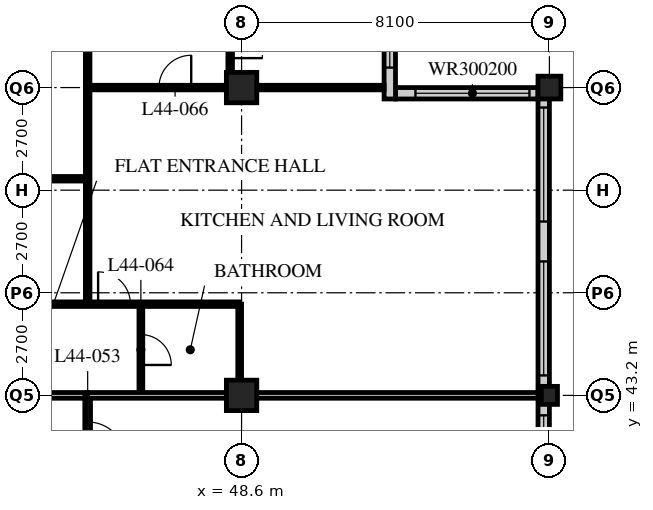
"""IFC4 building model, lengths in metres.
Left out: names, types, materials, properties, quantities, classifications, styles, units other than length and angle.
Written with IfcOpenShell. Run it as: python <this file> out.ifc"""

import sys

from ifc_helpers import new_model, si_unit, direction, frame, frame_2d, origin, origin_2d, place, context, subcontext, project, spatial, rectangle, hollow_rectangle, i_section, extrude, element, fill, save


model = new_model("IFC4")
c1 = context("Model", 3, precision=1e-05, world=origin(), true_north=direction((0.0, 1.0)))
c2 = subcontext(c1, "Body", "Model", "MODEL_VIEW")
j1 = project(units=[si_unit("LENGTHUNIT", "METRE"), si_unit("PLANEANGLEUNIT", "RADIAN")], contexts=[c1])
p1 = place(None, origin())
s1 = spatial("IfcSite", under=j1, at=p1, CompositionType="ELEMENT")
p2 = place(p1, origin())
s2 = spatial("IfcBuilding", under=s1, at=p2, CompositionType="ELEMENT")
p3 = place(p2, frame((0.0, 0.0, 174.0)))
s3 = spatial("IfcBuildingStorey", under=s2, at=p3, CompositionType="ELEMENT", Elevation=174.0)
for number, where, z_axis, x_axis in (
    (1, (48.6, 43.2, 0.0), (0.0, 0.0, 1.0), (1.0, 0.0, 0.0)),
    (2, (48.6, 51.3, 0.0), (0.0, 0.0, 1.0), (1.0, 0.0, 0.0)),
):
    element("IfcColumn", number, at=place(p3, frame(where, z_axis=z_axis, x_axis=x_axis)), inside=s3, PredefinedType="COLUMN", context=c2, shape_type="SweptSolid", body=[
        extrude(hollow_rectangle(XDim=0.8, YDim=0.8, WallThickness=0.08, at=origin_2d()), origin(), (0.0, 0.0, 1.0), 3.6),
    ])
p4 = place(p3, frame((56.7, 43.2, 0.0), z_axis=(0.0, 0.0, 1.0), x_axis=(1.0, 0.0, 0.0)))
e3 = element("IfcColumn", 3, at=p4, inside=s3, PredefinedType="COLUMN", context=c2, shape_type="SweptSolid", body=[
    extrude(i_section(OverallWidth=0.424, OverallDepth=0.475, WebThickness=0.048, FlangeThickness=0.077, FilletRadius=0.015, at=origin_2d()), origin(), (0.0, 0.0, 1.0), 3.6),
])
p5 = place(p3, frame((56.7, 51.3, 0.0), z_axis=(0.0, 0.0, 1.0), x_axis=(1.0, 0.0, 0.0)))
e4 = element("IfcColumn", 4, at=p5, inside=s3, PredefinedType="COLUMN", context=c2, shape_type="SweptSolid", body=[
    extrude(hollow_rectangle(XDim=0.6, YDim=0.6, WallThickness=0.05, at=origin_2d()), origin(), (0.0, 0.0, 1.0), 3.6),
])
p6 = place(p3, frame((56.55, 19.2, 0.0), z_axis=(0.0, 0.0, 1.0), x_axis=(0.0, 1.0, 0.0)))
e5 = element("IfcWall", 5, at=p6, inside=s3, PredefinedType="SOLIDWALL", context=c2, shape_type="SweptSolid", body=[
    extrude(rectangle(XDim=32.1, YDim=0.3, at=frame_2d((16.05, 0.0))), origin(), (0.0, 0.0, 1.0), 3.39),
])
p7 = place(p6, frame((0.225, 0.0, 0.6)))
e6 = element("IfcOpeningElement", 6, at=p7, cuts=e5, PredefinedType="OPENING", context=c2, shape_type="SweptSolid", body=[
    extrude(rectangle(XDim=3.0, YDim=2.4, at=frame_2d((1.5, 1.2))), frame((0.0, 0.16, 0.0), z_axis=(0.0, -1.0, 0.0), x_axis=(1.0, 0.0, 0.0)), (0.0, 0.0, 1.0), 0.32),
])
p8 = place(p6, frame((4.275, 0.0, 0.6)))
e7 = element("IfcOpeningElement", 7, at=p8, cuts=e5, PredefinedType="OPENING", context=c2, shape_type="SweptSolid", body=[
    extrude(rectangle(XDim=3.0, YDim=2.4, at=frame_2d((1.5, 1.2))), frame((0.0, 0.16, 0.0), z_axis=(0.0, -1.0, 0.0), x_axis=(1.0, 0.0, 0.0)), (0.0, 0.0, 1.0), 0.32),
])
p9 = place(p6, frame((8.325, 0.0, 0.6)))
e8 = element("IfcOpeningElement", 8, at=p9, cuts=e5, PredefinedType="OPENING", context=c2, shape_type="SweptSolid", body=[
    extrude(rectangle(XDim=3.0, YDim=2.4, at=frame_2d((1.5, 1.2))), frame((0.0, 0.16, 0.0), z_axis=(0.0, -1.0, 0.0), x_axis=(1.0, 0.0, 0.0)), (0.0, 0.0, 1.0), 0.32),
])
p10 = place(p6, frame((12.375, 0.0, 0.6)))
e9 = element("IfcOpeningElement", 9, at=p10, cuts=e5, PredefinedType="OPENING", context=c2, shape_type="SweptSolid", body=[
    extrude(rectangle(XDim=3.0, YDim=2.4, at=frame_2d((1.5, 1.2))), frame((0.0, 0.16, 0.0), z_axis=(0.0, -1.0, 0.0), x_axis=(1.0, 0.0, 0.0)), (0.0, 0.0, 1.0), 0.32),
])
p11 = place(p6, frame((16.425, 0.0, 0.6)))
e10 = element("IfcOpeningElement", 10, at=p11, cuts=e5, PredefinedType="OPENING", context=c2, shape_type="SweptSolid", body=[
    extrude(rectangle(XDim=3.0, YDim=2.4, at=frame_2d((1.5, 1.2))), frame((0.0, 0.16, 0.0), z_axis=(0.0, -1.0, 0.0), x_axis=(1.0, 0.0, 0.0)), (0.0, 0.0, 1.0), 0.32),
])
p12 = place(p6, frame((20.475, 0.0, 0.6)))
e11 = element("IfcOpeningElement", 11, at=p12, cuts=e5, PredefinedType="OPENING", context=c2, shape_type="SweptSolid", body=[
    extrude(rectangle(XDim=3.0, YDim=2.4, at=frame_2d((1.5, 1.2))), frame((0.0, 0.16, 0.0), z_axis=(0.0, -1.0, 0.0), x_axis=(1.0, 0.0, 0.0)), (0.0, 0.0, 1.0), 0.32),
])
p13 = place(p6, frame((24.525, 0.0, 0.6)))
e12 = element("IfcOpeningElement", 12, at=p13, cuts=e5, PredefinedType="OPENING", context=c2, shape_type="SweptSolid", body=[
    extrude(rectangle(XDim=3.0, YDim=2.4, at=frame_2d((1.5, 1.2))), frame((0.0, 0.16, 0.0), z_axis=(0.0, -1.0, 0.0), x_axis=(1.0, 0.0, 0.0)), (0.0, 0.0, 1.0), 0.32),
])
p14 = place(p6, frame((28.575, 0.0, 0.6)))
e13 = element("IfcOpeningElement", 13, at=p14, cuts=e5, PredefinedType="OPENING", context=c2, shape_type="SweptSolid", body=[
    extrude(rectangle(XDim=3.0, YDim=2.4, at=frame_2d((1.5, 1.2))), frame((0.0, 0.16, 0.0), z_axis=(0.0, -1.0, 0.0), x_axis=(1.0, 0.0, 0.0)), (0.0, 0.0, 1.0), 0.32),
])
p15 = place(p3, frame((56.4, 51.15, 0.0), z_axis=(0.0, 0.0, 1.0), x_axis=(-1.0, 0.0, 0.0)))
e14 = element("IfcWall", 14, at=p15, inside=s3, PredefinedType="SOLIDWALL", context=c2, shape_type="SweptSolid", body=[
    extrude(rectangle(XDim=3.75, YDim=0.3, at=frame_2d((1.875, 0.0))), origin(), (0.0, 0.0, 1.0), 3.39),
])
p16 = place(p15, frame((0.225, 0.0, 0.6)))
e15 = element("IfcOpeningElement", 15, at=p16, cuts=e14, PredefinedType="OPENING", context=c2, shape_type="SweptSolid", body=[
    extrude(rectangle(XDim=3.0, YDim=2.0, at=frame_2d((1.5, 1.0))), frame((0.0, 0.16, 0.0), z_axis=(0.0, -1.0, 0.0), x_axis=(1.0, 0.0, 0.0)), (0.0, 0.0, 1.0), 0.32),
])
p17 = place(p3, frame((52.5, 51.0, 0.0), z_axis=(0.0, 0.0, 1.0), x_axis=(0.0, 1.0, 0.0)))
e16 = element("IfcWall", 16, at=p17, inside=s3, PredefinedType="SOLIDWALL", context=c2, shape_type="SweptSolid", body=[
    extrude(rectangle(XDim=4.35, YDim=0.3, at=frame_2d((2.175, 0.0))), origin(), (0.0, 0.0, 1.0), 3.39),
])
p18 = place(p17, frame((0.825, 0.0, 0.6)))
e17 = element("IfcOpeningElement", 17, at=p18, cuts=e16, PredefinedType="OPENING", context=c2, shape_type="SweptSolid", body=[
    extrude(rectangle(XDim=3.0, YDim=2.0, at=frame_2d((1.5, 1.0))), frame((0.0, 0.16, 0.0), z_axis=(0.0, -1.0, 0.0), x_axis=(1.0, 0.0, 0.0)), (0.0, 0.0, 1.0), 0.32),
])
p19 = place(p3, frame((12.15, 43.2, 0.0), z_axis=(0.0, 0.0, 1.0), x_axis=(1.0, 0.0, 0.0)))
e18 = element("IfcWall", 18, at=p19, inside=s3, PredefinedType="PARTITIONING", context=c2, shape_type="SweptSolid", body=[
    extrude(rectangle(XDim=32.4, YDim=0.15, at=frame_2d((16.2, 0.0))), origin(), (0.0, 0.0, 1.0), 2.778),
])
p20 = place(p19, frame((4.95, 0.0, 0.0)))
e19 = element("IfcOpeningElement", 19, at=p20, cuts=e18, PredefinedType="OPENING", context=c2, shape_type="SweptSolid", body=[
    extrude(rectangle(XDim=1.0, YDim=2.1, at=frame_2d((0.5, 1.05))), frame((0.0, 0.085, 0.0), z_axis=(0.0, -1.0, 0.0), x_axis=(1.0, 0.0, 0.0)), (0.0, 0.0, 1.0), 0.17),
])
p21 = place(p19, frame((13.05, 0.0, 0.0)))
e20 = element("IfcOpeningElement", 20, at=p21, cuts=e18, PredefinedType="OPENING", context=c2, shape_type="SweptSolid", body=[
    extrude(rectangle(XDim=1.0, YDim=2.1, at=frame_2d((0.5, 1.05))), frame((0.0, 0.085, 0.0), z_axis=(0.0, -1.0, 0.0), x_axis=(1.0, 0.0, 0.0)), (0.0, 0.0, 1.0), 0.17),
])
p22 = place(p19, frame((21.15, 0.0, 0.0)))
e21 = element("IfcOpeningElement", 21, at=p22, cuts=e18, PredefinedType="OPENING", context=c2, shape_type="SweptSolid", body=[
    extrude(rectangle(XDim=1.0, YDim=2.1, at=frame_2d((0.5, 1.05))), frame((0.0, 0.085, 0.0), z_axis=(0.0, -1.0, 0.0), x_axis=(1.0, 0.0, 0.0)), (0.0, 0.0, 1.0), 0.17),
])
p23 = place(p19, frame((29.875, 0.0, 0.0)))
e22 = element("IfcOpeningElement", 22, at=p23, cuts=e18, PredefinedType="OPENING", context=c2, shape_type="SweptSolid", body=[
    extrude(rectangle(XDim=1.0, YDim=2.1, at=frame_2d((0.5, 1.05))), frame((0.0, 0.085, 0.0), z_axis=(0.0, -1.0, 0.0), x_axis=(1.0, 0.0, 0.0)), (0.0, 0.0, 1.0), 0.17),
])
p24 = place(p19, frame((1.525, 0.0, 0.0)))
e23 = element("IfcOpeningElement", 23, at=p24, cuts=e18, PredefinedType="OPENING", context=c2, shape_type="SweptSolid", body=[
    extrude(rectangle(XDim=1.0, YDim=2.1, at=frame_2d((0.5, 1.05))), frame((0.0, 0.085, 0.0), z_axis=(0.0, -1.0, 0.0), x_axis=(1.0, 0.0, 0.0)), (0.0, 0.0, 1.0), 0.17),
])
p25 = place(p3, frame((44.55, 18.9, 0.0), z_axis=(0.0, 0.0, 1.0), x_axis=(0.0, 1.0, 0.0)))
e24 = element("IfcWall", 24, at=p25, inside=s3, PredefinedType="PARTITIONING", context=c2, shape_type="SweptSolid", body=[
    extrude(rectangle(XDim=24.3, YDim=0.15, at=frame_2d((12.15, 0.0))), origin(), (0.0, 0.0, 1.0), 3.39),
])
p26 = place(p25, frame((2.35, 0.0, 0.0)))
e25 = element("IfcOpeningElement", 25, at=p26, cuts=e24, PredefinedType="OPENING", context=c2, shape_type="SweptSolid", body=[
    extrude(rectangle(XDim=1.0, YDim=2.1, at=frame_2d((0.5, 1.05))), frame((0.0, 0.085, 0.0), z_axis=(0.0, -1.0, 0.0), x_axis=(1.0, 0.0, 0.0)), (0.0, 0.0, 1.0), 0.17),
])
p27 = place(p25, frame((4.45, 0.0, 0.0)))
e26 = element("IfcOpeningElement", 26, at=p27, cuts=e24, PredefinedType="OPENING", context=c2, shape_type="SweptSolid", body=[
    extrude(rectangle(XDim=1.0, YDim=2.1, at=frame_2d((0.5, 1.05))), frame((0.0, 0.085, 0.0), z_axis=(0.0, -1.0, 0.0), x_axis=(1.0, 0.0, 0.0)), (0.0, 0.0, 1.0), 0.17),
])
p28 = place(p25, frame((18.55, 0.0, 0.0)))
e27 = element("IfcOpeningElement", 27, at=p28, cuts=e24, PredefinedType="OPENING", context=c2, shape_type="SweptSolid", body=[
    extrude(rectangle(XDim=1.0, YDim=2.1, at=frame_2d((0.5, 1.05))), frame((0.0, 0.085, 0.0), z_axis=(0.0, -1.0, 0.0), x_axis=(1.0, 0.0, 0.0)), (0.0, 0.0, 1.0), 0.17),
])
p29 = place(p25, frame((22.6, 0.0, 0.0)))
e28 = element("IfcOpeningElement", 28, at=p29, cuts=e24, PredefinedType="OPENING", context=c2, shape_type="SweptSolid", body=[
    extrude(rectangle(XDim=1.0, YDim=2.1, at=frame_2d((0.5, 1.05))), frame((0.0, 0.085, 0.0), z_axis=(0.0, -1.0, 0.0), x_axis=(1.0, 0.0, 0.0)), (0.0, 0.0, 1.0), 0.17),
])
p30 = place(p3, frame((45.95, 43.2, 0.0), z_axis=(0.0, 0.0, 1.0), x_axis=(0.0, 1.0, 0.0)))
e29 = element("IfcWall", 29, at=p30, inside=s3, PredefinedType="PARTITIONING", context=c2, shape_type="SweptSolid", body=[
    extrude(rectangle(XDim=2.4, YDim=0.1, at=frame_2d((1.2, 0.0))), origin(), (0.0, 0.0, 1.0), 3.39),
])
p31 = place(p30, frame((0.8, 0.0, 0.0)))
e30 = element("IfcOpeningElement", 30, at=p31, cuts=e29, PredefinedType="OPENING", context=c2, shape_type="SweptSolid", body=[
    extrude(rectangle(XDim=0.8, YDim=2.1, at=frame_2d((0.4, 1.05))), frame((0.0, 0.06, 0.0), z_axis=(0.0, -1.0, 0.0), x_axis=(1.0, 0.0, 0.0)), (0.0, 0.0, 1.0), 0.12),
])
p32 = place(p3, frame((48.55, 43.2, 0.0), z_axis=(0.0, 0.0, 1.0), x_axis=(0.0, 1.0, 0.0)))
e31 = element("IfcWall", 31, at=p32, inside=s3, PredefinedType="PARTITIONING", context=c2, shape_type="SweptSolid", body=[
    extrude(rectangle(XDim=2.4, YDim=0.1, at=frame_2d((1.2, 0.0))), origin(), (0.0, 0.0, 1.0), 2.778),
])
p33 = place(p3, frame((44.55, 45.6, 0.0), z_axis=(0.0, 0.0, 1.0), x_axis=(0.0, 1.0, 0.0)))
e32 = element("IfcWall", 32, at=p33, inside=s3, PredefinedType="PARTITIONING", context=c2, shape_type="SweptSolid", body=[
    extrude(rectangle(XDim=13.5, YDim=0.12, at=frame_2d((6.75, 0.0))), origin(), (0.0, 0.0, 1.0), 3.39),
])
p34 = place(p3, frame((44.55, 51.3, 0.0), z_axis=(0.0, 0.0, 1.0), x_axis=(1.0, 0.0, 0.0)))
e33 = element("IfcWall", 33, at=p34, inside=s3, PredefinedType="PARTITIONING", context=c2, shape_type="SweptSolid", body=[
    extrude(rectangle(XDim=7.8, YDim=0.12, at=frame_2d((3.9, 0.0))), origin(), (0.0, 0.0, 1.0), 2.778),
])
p35 = place(p34, frame((1.875, 0.0, 0.0)))
e34 = element("IfcOpeningElement", 34, at=p35, cuts=e33, PredefinedType="OPENING", context=c2, shape_type="SweptSolid", body=[
    extrude(rectangle(XDim=0.85, YDim=2.1, at=frame_2d((0.425, 1.05))), frame((0.0, 0.07, 0.0), z_axis=(0.0, -1.0, 0.0), x_axis=(1.0, 0.0, 0.0)), (0.0, 0.0, 1.0), 0.14),
])
p36 = place(p3, frame((44.55, 43.2, 0.0), z_axis=(0.0, 0.0, 1.0), x_axis=(1.0, 0.0, 0.0)))
e35 = element("IfcWall", 35, at=p36, inside=s3, PredefinedType="PARTITIONING", context=c2, shape_type="SweptSolid", body=[
    extrude(rectangle(XDim=11.85, YDim=0.15, at=frame_2d((5.925, 0.0))), origin(), (0.0, 0.0, 1.0), 2.778),
])
p37 = place(p3, frame((8.15, 45.6, 0.0), z_axis=(0.0, 0.0, 1.0), x_axis=(1.0, 0.0, 0.0)))
e36 = element("IfcWall", 36, at=p37, inside=s3, PredefinedType="PARTITIONING", context=c2, shape_type="SweptSolid", body=[
    extrude(rectangle(XDim=40.4, YDim=0.12, at=frame_2d((20.2, 0.0))), origin(), (0.0, 0.0, 1.0), 3.39),
])
p38 = place(p37, frame((9.025, 0.0, 0.0)))
e37 = element("IfcOpeningElement", 37, at=p38, cuts=e36, PredefinedType="OPENING", context=c2, shape_type="SweptSolid", body=[
    extrude(rectangle(XDim=0.85, YDim=2.1, at=frame_2d((0.425, 1.05))), frame((0.0, 0.07, 0.0), z_axis=(0.0, -1.0, 0.0), x_axis=(1.0, 0.0, 0.0)), (0.0, 0.0, 1.0), 0.14),
])
p39 = place(p37, frame((12.425, 0.0, 0.0)))
e38 = element("IfcOpeningElement", 38, at=p39, cuts=e36, PredefinedType="OPENING", context=c2, shape_type="SweptSolid", body=[
    extrude(rectangle(XDim=0.85, YDim=2.1, at=frame_2d((0.425, 1.05))), frame((0.0, 0.07, 0.0), z_axis=(0.0, -1.0, 0.0), x_axis=(1.0, 0.0, 0.0)), (0.0, 0.0, 1.0), 0.14),
])
p40 = place(p37, frame((17.125, 0.0, 0.0)))
e39 = element("IfcOpeningElement", 39, at=p40, cuts=e36, PredefinedType="OPENING", context=c2, shape_type="SweptSolid", body=[
    extrude(rectangle(XDim=0.85, YDim=2.1, at=frame_2d((0.425, 1.05))), frame((0.0, 0.07, 0.0), z_axis=(0.0, -1.0, 0.0), x_axis=(1.0, 0.0, 0.0)), (0.0, 0.0, 1.0), 0.14),
])
p41 = place(p37, frame((20.525, 0.0, 0.0)))
e40 = element("IfcOpeningElement", 40, at=p41, cuts=e36, PredefinedType="OPENING", context=c2, shape_type="SweptSolid", body=[
    extrude(rectangle(XDim=0.85, YDim=2.1, at=frame_2d((0.425, 1.05))), frame((0.0, 0.07, 0.0), z_axis=(0.0, -1.0, 0.0), x_axis=(1.0, 0.0, 0.0)), (0.0, 0.0, 1.0), 0.14),
])
p42 = place(p37, frame((25.225, 0.0, 0.0)))
e41 = element("IfcOpeningElement", 41, at=p42, cuts=e36, PredefinedType="OPENING", context=c2, shape_type="SweptSolid", body=[
    extrude(rectangle(XDim=0.85, YDim=2.1, at=frame_2d((0.425, 1.05))), frame((0.0, 0.07, 0.0), z_axis=(0.0, -1.0, 0.0), x_axis=(1.0, 0.0, 0.0)), (0.0, 0.0, 1.0), 0.14),
])
p43 = place(p37, frame((28.625, 0.0, 0.0)))
e42 = element("IfcOpeningElement", 42, at=p43, cuts=e36, PredefinedType="OPENING", context=c2, shape_type="SweptSolid", body=[
    extrude(rectangle(XDim=0.85, YDim=2.1, at=frame_2d((0.425, 1.05))), frame((0.0, 0.07, 0.0), z_axis=(0.0, -1.0, 0.0), x_axis=(1.0, 0.0, 0.0)), (0.0, 0.0, 1.0), 0.14),
])
p44 = place(p37, frame((32.825, 0.0, 0.0)))
e43 = element("IfcOpeningElement", 43, at=p44, cuts=e36, PredefinedType="OPENING", context=c2, shape_type="SweptSolid", body=[
    extrude(rectangle(XDim=0.85, YDim=2.1, at=frame_2d((0.425, 1.05))), frame((0.0, 0.07, 0.0), z_axis=(0.0, -1.0, 0.0), x_axis=(1.0, 0.0, 0.0)), (0.0, 0.0, 1.0), 0.14),
])
p45 = place(p37, frame((36.675, 0.0, 0.0)))
e44 = element("IfcOpeningElement", 44, at=p45, cuts=e36, PredefinedType="OPENING", context=c2, shape_type="SweptSolid", body=[
    extrude(rectangle(XDim=0.85, YDim=2.1, at=frame_2d((0.425, 1.05))), frame((0.0, 0.07, 0.0), z_axis=(0.0, -1.0, 0.0), x_axis=(1.0, 0.0, 0.0)), (0.0, 0.0, 1.0), 0.14),
])
p46 = place(p37, frame((6.725, 0.0, 0.0)))
e45 = element("IfcOpeningElement", 45, at=p46, cuts=e36, PredefinedType="OPENING", context=c2, shape_type="SweptSolid", body=[
    extrude(rectangle(XDim=0.85, YDim=2.1, at=frame_2d((0.425, 1.05))), frame((0.0, 0.07, 0.0), z_axis=(0.0, -1.0, 0.0), x_axis=(1.0, 0.0, 0.0)), (0.0, 0.0, 1.0), 0.14),
])
p47 = place(p37, frame((2.875, 0.0, 0.0)))
e46 = element("IfcOpeningElement", 46, at=p47, cuts=e36, PredefinedType="OPENING", context=c2, shape_type="SweptSolid", body=[
    extrude(rectangle(XDim=0.85, YDim=2.1, at=frame_2d((0.425, 1.05))), frame((0.0, 0.07, 0.0), z_axis=(0.0, -1.0, 0.0), x_axis=(1.0, 0.0, 0.0)), (0.0, 0.0, 1.0), 0.14),
])
p48 = place(p3, frame((48.3, 51.3, 0.0), z_axis=(0.0, 0.0, 1.0), x_axis=(0.0, 1.0, 0.0)))
e47 = element("IfcWall", 47, at=p48, inside=s3, PredefinedType="PARTITIONING", context=c2, shape_type="SweptSolid", body=[
    extrude(rectangle(XDim=3.75, YDim=0.12, at=frame_2d((1.875, 0.0))), origin(), (0.0, 0.0, 1.0), 3.39),
])
p49 = place(p48, frame((0.775, 0.0, 0.0)))
e48 = element("IfcOpeningElement", 48, at=p49, cuts=e47, PredefinedType="OPENING", context=c2, shape_type="SweptSolid", body=[
    extrude(rectangle(XDim=0.85, YDim=2.1, at=frame_2d((0.425, 1.05))), frame((0.0, 0.07, 0.0), z_axis=(0.0, -1.0, 0.0), x_axis=(1.0, 0.0, 0.0)), (0.0, 0.0, 1.0), 0.14),
])
p50 = place(p3, frame((36.45, 48.9, 0.0), z_axis=(0.0, 0.0, 1.0), x_axis=(1.0, 0.0, 0.0)))
e49 = element("IfcWall", 49, at=p50, inside=s3, PredefinedType="PARTITIONING", context=c2, shape_type="SweptSolid", body=[
    extrude(rectangle(XDim=8.1, YDim=0.12, at=frame_2d((4.05, 0.0))), origin(), (0.0, 0.0, 1.0), 3.39),
])
p51 = place(p50, frame((1.6, 0.0, 0.0)))
e50 = element("IfcOpeningElement", 50, at=p51, cuts=e49, PredefinedType="OPENING", context=c2, shape_type="SweptSolid", body=[
    extrude(rectangle(XDim=0.85, YDim=2.1, at=frame_2d((0.425, 1.05))), frame((0.0, 0.07, 0.0), z_axis=(0.0, -1.0, 0.0), x_axis=(1.0, 0.0, 0.0)), (0.0, 0.0, 1.0), 0.14),
])
p52 = place(p50, frame((5.65, 0.0, 0.0)))
e51 = element("IfcOpeningElement", 51, at=p52, cuts=e49, PredefinedType="OPENING", context=c2, shape_type="SweptSolid", body=[
    extrude(rectangle(XDim=0.85, YDim=2.1, at=frame_2d((0.425, 1.05))), frame((0.0, 0.07, 0.0), z_axis=(0.0, -1.0, 0.0), x_axis=(1.0, 0.0, 0.0)), (0.0, 0.0, 1.0), 0.14),
])
p53 = place(p12, origin())
e52 = element("IfcWindow", 52, at=p53, inside=s3, PartitioningType="SINGLE_PANEL", PredefinedType="WINDOW", context=c2, shape_type="SweptSolid", body=[
    extrude(rectangle(XDim=3.0, YDim=2.4, at=frame_2d((1.5, 1.2))), frame((0.0, 0.03, 0.0), z_axis=(0.0, -1.0, 0.0), x_axis=(1.0, 0.0, 0.0)), (0.0, 0.0, 1.0), 0.06),
])
fill(e11, e52)
p54 = place(p13, origin())
e53 = element("IfcWindow", 53, at=p54, inside=s3, PartitioningType="SINGLE_PANEL", PredefinedType="WINDOW", context=c2, shape_type="SweptSolid", body=[
    extrude(rectangle(XDim=3.0, YDim=2.4, at=frame_2d((1.5, 1.2))), frame((0.0, 0.03, 0.0), z_axis=(0.0, -1.0, 0.0), x_axis=(1.0, 0.0, 0.0)), (0.0, 0.0, 1.0), 0.06),
])
fill(e12, e53)
p55 = place(p14, origin())
e54 = element("IfcWindow", 54, at=p55, inside=s3, PartitioningType="SINGLE_PANEL", PredefinedType="WINDOW", context=c2, shape_type="SweptSolid", body=[
    extrude(rectangle(XDim=3.0, YDim=2.4, at=frame_2d((1.5, 1.2))), frame((0.0, 0.03, 0.0), z_axis=(0.0, -1.0, 0.0), x_axis=(1.0, 0.0, 0.0)), (0.0, 0.0, 1.0), 0.06),
])
fill(e13, e54)
p56 = place(p16, origin())
e55 = element("IfcWindow", 55, at=p56, inside=s3, PartitioningType="SINGLE_PANEL", PredefinedType="WINDOW", context=c2, shape_type="SweptSolid", body=[
    extrude(rectangle(XDim=3.0, YDim=2.0, at=frame_2d((1.5, 1.0))), frame((0.0, 0.03, 0.0), z_axis=(0.0, -1.0, 0.0), x_axis=(1.0, 0.0, 0.0)), (0.0, 0.0, 1.0), 0.06),
])
fill(e15, e55)
p57 = place(p18, origin())
e56 = element("IfcWindow", 56, at=p57, inside=s3, PartitioningType="SINGLE_PANEL", PredefinedType="WINDOW", context=c2, shape_type="SweptSolid", body=[
    extrude(rectangle(XDim=3.0, YDim=2.0, at=frame_2d((1.5, 1.0))), frame((0.0, 0.03, 0.0), z_axis=(0.0, -1.0, 0.0), x_axis=(1.0, 0.0, 0.0)), (0.0, 0.0, 1.0), 0.06),
])
fill(e17, e56)
p58 = place(p29, origin())
e57 = element("IfcDoor", 57, at=p58, inside=s3, OperationType="SINGLE_SWING_RIGHT", PredefinedType="DOOR", context=c2, shape_type="SweptSolid", body=[
    extrude(rectangle(XDim=1.0, YDim=2.1, at=frame_2d((0.5, 1.05))), frame((0.0, 0.025, 0.0), z_axis=(0.0, -1.0, 0.0), x_axis=(1.0, 0.0, 0.0)), (0.0, 0.0, 1.0), 0.05),
])
fill(e28, e57)
p59 = place(p31, origin())
e58 = element("IfcDoor", 58, at=p59, inside=s3, OperationType="SINGLE_SWING_RIGHT", PredefinedType="DOOR", context=c2, shape_type="SweptSolid", body=[
    extrude(rectangle(XDim=0.8, YDim=2.1, at=frame_2d((0.4, 1.05))), frame((0.0, 0.025, 0.0), z_axis=(0.0, -1.0, 0.0), x_axis=(1.0, 0.0, 0.0)), (0.0, 0.0, 1.0), 0.05),
])
fill(e30, e58)
p60 = place(p45, origin())
e59 = element("IfcDoor", 59, at=p60, inside=s3, OperationType="SINGLE_SWING_LEFT", PredefinedType="DOOR", context=c2, shape_type="SweptSolid", body=[
    extrude(rectangle(XDim=0.85, YDim=2.1, at=frame_2d((0.425, 1.05))), frame((0.0, 0.025, 0.0), z_axis=(0.0, -1.0, 0.0), x_axis=(1.0, 0.0, 0.0)), (0.0, 0.0, 1.0), 0.05),
])
fill(e44, e59)
p61 = place(p35, origin())
e60 = element("IfcDoor", 60, at=p61, inside=s3, OperationType="SINGLE_SWING_RIGHT", PredefinedType="DOOR", context=c2, shape_type="SweptSolid", body=[
    extrude(rectangle(XDim=0.85, YDim=2.1, at=frame_2d((0.425, 1.05))), frame((0.0, 0.025, 0.0), z_axis=(0.0, -1.0, 0.0), x_axis=(1.0, 0.0, 0.0)), (0.0, 0.0, 1.0), 0.05),
])
fill(e34, e60)
p62 = place(p49, origin())
e61 = element("IfcDoor", 61, at=p62, inside=s3, OperationType="SINGLE_SWING_RIGHT", PredefinedType="DOOR", context=c2, shape_type="SweptSolid", body=[
    extrude(rectangle(XDim=0.85, YDim=2.1, at=frame_2d((0.425, 1.05))), frame((0.0, 0.025, 0.0), z_axis=(0.0, -1.0, 0.0), x_axis=(1.0, 0.0, 0.0)), (0.0, 0.0, 1.0), 0.05),
])
fill(e48, e61)
save(model, sys.argv[1])
